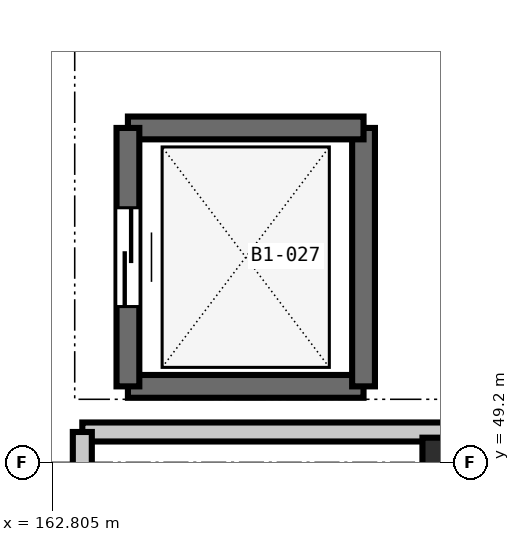
"""IFC4 building model, lengths in metres.
Left out: names, types, materials, properties, quantities, classifications, styles, units other than length and angle.
Written with IfcOpenShell. Run it as: python <this file> out.ifc"""

import sys

from ifc_helpers import new_model, si_unit, direction, frame, frame_2d, origin, origin_2d, place, context, subcontext, project, spatial, rectangle, extrude, element, fill, save


model = new_model("IFC4")
c1 = context("Model", 3, precision=1e-05, world=origin(), true_north=direction((0.0, 1.0)))
c2 = subcontext(c1, "Body", "Model", "MODEL_VIEW")
j1 = project(units=[si_unit("LENGTHUNIT", "METRE"), si_unit("PLANEANGLEUNIT", "RADIAN")], contexts=[c1])
p1 = place(None, origin())
s1 = spatial("IfcSite", under=j1, at=p1, CompositionType="ELEMENT")
p2 = place(p1, origin())
s2 = spatial("IfcBuilding", under=s1, at=p2, CompositionType="ELEMENT")
p3 = place(p2, frame((0.0, 0.0, -4.8)))
s3 = spatial("IfcBuildingStorey", under=s2, at=p3, CompositionType="ELEMENT", Elevation=-4.8)
p4 = place(p3, frame((168.0, 49.2, 0.0), z_axis=(0.0, 0.0, 1.0), x_axis=(1.0, 0.0, 0.0)))
e1 = element("IfcColumn", 1, at=p4, inside=s3, PredefinedType="COLUMN", context=c2, shape_type="SweptSolid", body=[
    extrude(rectangle(XDim=0.65, YDim=0.65, at=origin_2d()), origin(), (0.0, 0.0, 1.0), 4.8),
])
p5 = place(p3, frame((163.8, 50.2, 0.0), z_axis=(0.0, 0.0, 1.0), x_axis=(1.0, 0.0, 0.0)))
e2 = element("IfcWall", 2, at=p5, inside=s3, PredefinedType="SHEAR", context=c2, shape_type="SweptSolid", body=[
    extrude(rectangle(XDim=3.1, YDim=0.3, at=frame_2d((1.55, 0.0))), origin(), (0.0, 0.0, 1.0), 4.8),
])
p6 = place(p3, frame((166.9, 50.2, 0.0), z_axis=(0.0, 0.0, 1.0), x_axis=(0.0, 1.0, 0.0)))
e3 = element("IfcWall", 3, at=p6, inside=s3, PredefinedType="SHEAR", context=c2, shape_type="SweptSolid", body=[
    extrude(rectangle(XDim=3.4, YDim=0.3, at=frame_2d((1.7, 0.0))), origin(), (0.0, 0.0, 1.0), 4.8),
])
p7 = place(p3, frame((166.9, 53.6, 0.0), z_axis=(0.0, 0.0, 1.0), x_axis=(-1.0, 0.0, 0.0)))
e4 = element("IfcWall", 4, at=p7, inside=s3, PredefinedType="SHEAR", context=c2, shape_type="SweptSolid", body=[
    extrude(rectangle(XDim=3.1, YDim=0.3, at=frame_2d((1.55, 0.0))), origin(), (0.0, 0.0, 1.0), 4.8),
])
p8 = place(p3, frame((163.8, 53.6, 0.0), z_axis=(0.0, 0.0, 1.0), x_axis=(0.0, -1.0, 0.0)))
e5 = element("IfcWall", 5, at=p8, inside=s3, PredefinedType="SHEAR", context=c2, shape_type="SweptSolid", body=[
    extrude(rectangle(XDim=3.4, YDim=0.3, at=frame_2d((1.7, 0.0))), origin(), (0.0, 0.0, 1.0), 4.8),
])
p9 = place(p8, frame((1.05, 0.0, 0.0)))
e6 = element("IfcOpeningElement", 6, at=p9, cuts=e5, PredefinedType="OPENING", context=c2, shape_type="SweptSolid", body=[
    extrude(rectangle(XDim=1.3, YDim=2.2, at=frame_2d((0.65, 1.1))), frame((0.0, 0.16, 0.0), z_axis=(0.0, -1.0, 0.0), x_axis=(1.0, 0.0, 0.0)), (0.0, 0.0, 1.0), 0.32),
])
p10 = place(p3, frame((163.2, 49.6, 0.0), z_axis=(0.0, 0.0, 1.0), x_axis=(1.0, 0.0, 0.0)))
e7 = element("IfcWall", 7, at=p10, inside=s3, PredefinedType="PARTITIONING", context=c2, shape_type="SweptSolid", body=[
    extrude(rectangle(XDim=12.8, YDim=0.25, at=frame_2d((6.4, 0.0))), origin(), (0.0, 0.0, 1.0), 4.44),
])
p11 = place(p3, frame((163.2, 41.2, 0.0), z_axis=(0.0, 0.0, 1.0), x_axis=(0.0, 1.0, 0.0)))
e8 = element("IfcWall", 8, at=p11, inside=s3, PredefinedType="PARTITIONING", context=c2, shape_type="SweptSolid", body=[
    extrude(rectangle(XDim=8.4, YDim=0.25, at=frame_2d((4.2, 0.0))), origin(), (0.0, 0.0, 1.0), 4.44),
])
p12 = place(p11, frame((3.275, 0.0, 0.0)))
e9 = element("IfcOpeningElement", 9, at=p12, cuts=e8, PredefinedType="OPENING", context=c2, shape_type="SweptSolid", body=[
    extrude(rectangle(XDim=1.85, YDim=2.3, at=frame_2d((0.925, 1.15))), frame((0.0, 0.135, 0.0), z_axis=(0.0, -1.0, 0.0), x_axis=(1.0, 0.0, 0.0)), (0.0, 0.0, 1.0), 0.27),
])
p13 = place(p9, origin())
e10 = element("IfcDoor", 10, at=p13, inside=s3, OperationType="DOUBLE_DOOR_SLIDING", PredefinedType="DOOR", context=c2, shape_type="SweptSolid", body=[
    extrude(rectangle(XDim=1.3, YDim=2.2, at=frame_2d((0.65, 1.1))), frame((0.0, 0.025, 0.0), z_axis=(0.0, -1.0, 0.0), x_axis=(1.0, 0.0, 0.0)), (0.0, 0.0, 1.0), 0.05),
])
fill(e6, e10)
save(model, sys.argv[1])
